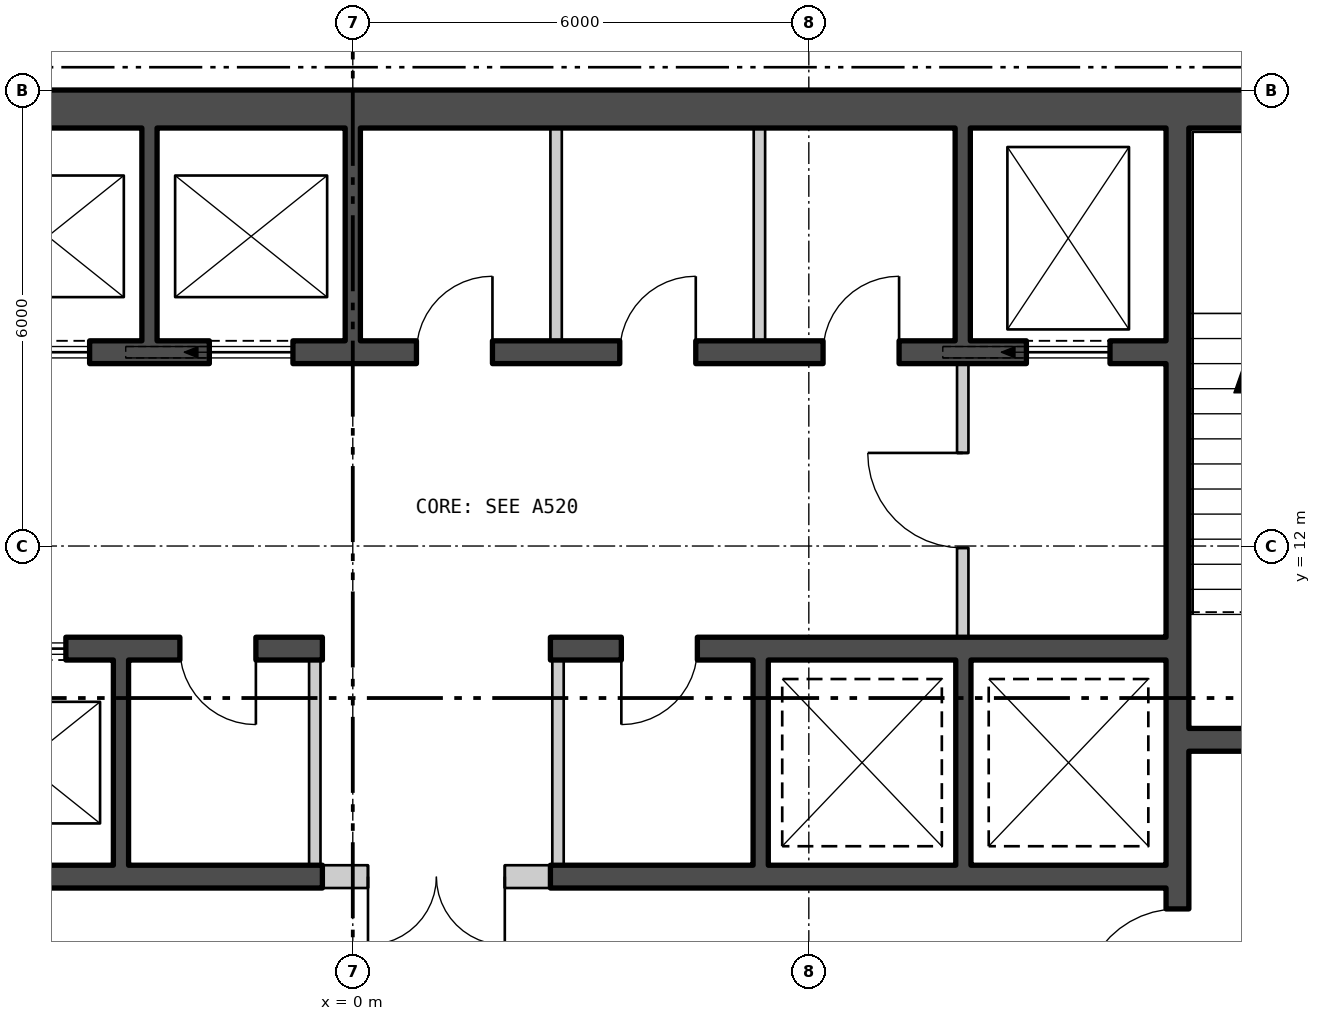
"""IFC4 building model, lengths in metres.
Left out: names, types, materials, properties, quantities, classifications, styles, units other than length and angle.
Written with IfcOpenShell. Run it as: python <this file> out.ifc"""

import sys

from ifc_helpers import new_model, si_unit, direction, frame, frame_2d, origin, place, context, subcontext, project, spatial, polyline, rectangle, outline, extrude, element, fill, save


model = new_model("IFC4")
c1 = context("Model", 3, precision=1e-05, world=origin(), true_north=direction((0.0, 1.0)))
c2 = subcontext(c1, "Body", "Model", "MODEL_VIEW")
j1 = project(units=[si_unit("LENGTHUNIT", "METRE"), si_unit("PLANEANGLEUNIT", "RADIAN")], contexts=[c1])
p1 = place(None, origin())
s1 = spatial("IfcSite", under=j1, at=p1, CompositionType="ELEMENT")
p2 = place(p1, origin())
s2 = spatial("IfcBuilding", under=s1, at=p2, CompositionType="ELEMENT")
p3 = place(p2, frame((0.0, 0.0, 139.8)))
s3 = spatial("IfcBuildingStorey", under=s2, at=p3, CompositionType="ELEMENT", Elevation=139.8)
p4 = place(p3, frame((4.36, -27.198, -0.18), z_axis=(0.0, 0.0, 1.0), x_axis=(0.500000335318, 0.866025210188, 0.0)))
e1 = element("IfcWall", 1, at=p4, inside=s3, PredefinedType="SOLIDWALL", context=c2, shape_type="SweptSolid", body=[
    extrude(outline(polyline([(-0.13, -0.225), (45.88, -0.225), (45.62, 0.225), (0.13, 0.225), (-0.13, -0.225)])), origin(), (0.0, 0.0, 1.0), 3.68),
])
p5 = place(p4, frame((1.425, 0.0, 1.08)))
e2 = element("IfcOpeningElement", 2, at=p5, cuts=e1, PredefinedType="OPENING", context=c2, shape_type="SweptSolid", body=[
    extrude(rectangle(XDim=2.4, YDim=2.0, at=frame_2d((1.2, 1.0))), frame((0.0, 0.235, 0.0), z_axis=(0.0, -1.0, 0.0), x_axis=(1.0, 0.0, 0.0)), (0.0, 0.0, 1.0), 0.47),
])
p6 = place(p4, frame((5.895, 0.0, 1.08)))
e3 = element("IfcOpeningElement", 3, at=p6, cuts=e1, PredefinedType="OPENING", context=c2, shape_type="SweptSolid", body=[
    extrude(rectangle(XDim=2.4, YDim=2.0, at=frame_2d((1.2, 1.0))), frame((0.0, 0.235, 0.0), z_axis=(0.0, -1.0, 0.0), x_axis=(1.0, 0.0, 0.0)), (0.0, 0.0, 1.0), 0.47),
])
p7 = place(p4, frame((10.403, 0.0, 1.08)))
e4 = element("IfcOpeningElement", 4, at=p7, cuts=e1, PredefinedType="OPENING", context=c2, shape_type="SweptSolid", body=[
    extrude(rectangle(XDim=2.4, YDim=2.0, at=frame_2d((1.2, 1.0))), frame((0.0, 0.235, 0.0), z_axis=(0.0, -1.0, 0.0), x_axis=(1.0, 0.0, 0.0)), (0.0, 0.0, 1.0), 0.47),
])
p8 = place(p4, frame((14.912, 0.0, 1.08)))
e5 = element("IfcOpeningElement", 5, at=p8, cuts=e1, PredefinedType="OPENING", context=c2, shape_type="SweptSolid", body=[
    extrude(rectangle(XDim=2.4, YDim=2.0, at=frame_2d((1.2, 1.0))), frame((0.0, 0.235, 0.0), z_axis=(0.0, -1.0, 0.0), x_axis=(1.0, 0.0, 0.0)), (0.0, 0.0, 1.0), 0.47),
])
p9 = place(p4, frame((19.421, 0.0, 1.08)))
e6 = element("IfcOpeningElement", 6, at=p9, cuts=e1, PredefinedType="OPENING", context=c2, shape_type="SweptSolid", body=[
    extrude(rectangle(XDim=2.4, YDim=2.0, at=frame_2d((1.2, 1.0))), frame((0.0, 0.235, 0.0), z_axis=(0.0, -1.0, 0.0), x_axis=(1.0, 0.0, 0.0)), (0.0, 0.0, 1.0), 0.47),
])
p10 = place(p4, frame((23.929, 0.0, 1.08)))
e7 = element("IfcOpeningElement", 7, at=p10, cuts=e1, PredefinedType="OPENING", context=c2, shape_type="SweptSolid", body=[
    extrude(rectangle(XDim=2.4, YDim=2.0, at=frame_2d((1.2, 1.0))), frame((0.0, 0.235, 0.0), z_axis=(0.0, -1.0, 0.0), x_axis=(1.0, 0.0, 0.0)), (0.0, 0.0, 1.0), 0.47),
])
p11 = place(p4, frame((37.455, 0.0, 1.08)))
e8 = element("IfcOpeningElement", 8, at=p11, cuts=e1, PredefinedType="OPENING", context=c2, shape_type="SweptSolid", body=[
    extrude(rectangle(XDim=2.4, YDim=2.0, at=frame_2d((1.2, 1.0))), frame((0.0, 0.235, 0.0), z_axis=(0.0, -1.0, 0.0), x_axis=(1.0, 0.0, 0.0)), (0.0, 0.0, 1.0), 0.47),
])
p12 = place(p4, frame((41.925, 0.0, 1.08)))
e9 = element("IfcOpeningElement", 9, at=p12, cuts=e1, PredefinedType="OPENING", context=c2, shape_type="SweptSolid", body=[
    extrude(rectangle(XDim=2.4, YDim=2.0, at=frame_2d((1.2, 1.0))), frame((0.0, 0.235, 0.0), z_axis=(0.0, -1.0, 0.0), x_axis=(1.0, 0.0, 0.0)), (0.0, 0.0, 1.0), 0.47),
])
p13 = place(p3, frame((-16.2, 17.75, 0.0), z_axis=(0.0, 0.0, 1.0), x_axis=(1.0, 0.0, 0.0)))
e10 = element("IfcWall", 10, at=p13, inside=s3, PredefinedType="SHEAR", context=c2, shape_type="SweptSolid", body=[
    extrude(rectangle(XDim=32.4, YDim=0.5, at=frame_2d((16.2, 0.0))), origin(), (0.0, 0.0, 1.0), 3.7),
])
p14 = place(p3, frame((10.85, 2.5, 0.0), z_axis=(0.0, 0.0, 1.0), x_axis=(0.0, 1.0, 0.0)))
e11 = element("IfcWall", 11, at=p14, inside=s3, PredefinedType="SHEAR", context=c2, shape_type="SweptSolid", body=[
    extrude(rectangle(XDim=15.0, YDim=0.3, at=frame_2d((7.5, 0.0))), origin(), (0.0, 0.0, 1.0), 3.7),
])
p15 = place(p14, frame((3.475, 0.0, 0.0)))
e12 = element("IfcOpeningElement", 12, at=p15, cuts=e11, PredefinedType="OPENING", context=c2, shape_type="SweptSolid", body=[
    extrude(rectangle(XDim=1.25, YDim=2.1, at=frame_2d((0.625, 1.05))), frame((0.0, 0.16, 0.0), z_axis=(0.0, -1.0, 0.0), x_axis=(1.0, 0.0, 0.0)), (0.0, 0.0, 1.0), 0.32),
])
p16 = place(p14, frame((1.125, 0.0, 0.0)))
e13 = element("IfcOpeningElement", 13, at=p16, cuts=e11, PredefinedType="OPENING", context=c2, shape_type="SweptSolid", body=[
    extrude(rectangle(XDim=1.0, YDim=2.1, at=frame_2d((0.5, 1.05))), frame((0.0, 0.16, 0.0), z_axis=(0.0, -1.0, 0.0), x_axis=(1.0, 0.0, 0.0)), (0.0, 0.0, 1.0), 0.32),
])
p17 = place(p3, frame((11.0, 9.45, 0.0), z_axis=(0.0, 0.0, 1.0), x_axis=(1.0, 0.0, 0.0)))
e14 = element("IfcWall", 14, at=p17, inside=s3, PredefinedType="SHEAR", context=c2, shape_type="SweptSolid", body=[
    extrude(rectangle(XDim=3.2, YDim=0.3, at=frame_2d((1.6, 0.0))), origin(), (0.0, 0.0, 1.0), 3.7),
])
p18 = place(p17, frame((1.0, 0.0, 0.0)))
e15 = element("IfcOpeningElement", 15, at=p18, cuts=e14, PredefinedType="OPENING", context=c2, shape_type="SweptSolid", body=[
    extrude(rectangle(XDim=1.2, YDim=2.1, at=frame_2d((0.6, 1.05))), frame((0.0, 0.16, 0.0), z_axis=(0.0, -1.0, 0.0), x_axis=(1.0, 0.0, 0.0)), (0.0, 0.0, 1.0), 0.32),
])
p19 = place(p3, frame((-10.7, 14.55, 0.0), z_axis=(0.0, 0.0, 1.0), x_axis=(1.0, 0.0, 0.0)))
e16 = element("IfcWall", 16, at=p19, inside=s3, PredefinedType="SHEAR", context=c2, shape_type="SweptSolid", body=[
    extrude(rectangle(XDim=21.4, YDim=0.3, at=frame_2d((10.7, 0.0))), origin(), (0.0, 0.0, 1.0), 3.7),
])
p20 = place(p19, frame((0.738, 0.0, 0.0)))
e17 = element("IfcOpeningElement", 17, at=p20, cuts=e16, PredefinedType="OPENING", context=c2, shape_type="SweptSolid", body=[
    extrude(rectangle(XDim=1.1, YDim=2.1, at=frame_2d((0.55, 1.05))), frame((0.0, 0.16, 0.0), z_axis=(0.0, -1.0, 0.0), x_axis=(1.0, 0.0, 0.0)), (0.0, 0.0, 1.0), 0.32),
])
p21 = place(p19, frame((3.462, 0.0, 0.0)))
e18 = element("IfcOpeningElement", 18, at=p21, cuts=e16, PredefinedType="OPENING", context=c2, shape_type="SweptSolid", body=[
    extrude(rectangle(XDim=1.1, YDim=2.1, at=frame_2d((0.55, 1.05))), frame((0.0, 0.16, 0.0), z_axis=(0.0, -1.0, 0.0), x_axis=(1.0, 0.0, 0.0)), (0.0, 0.0, 1.0), 0.32),
])
p22 = place(p19, frame((6.138, 0.0, 0.0)))
e19 = element("IfcOpeningElement", 19, at=p22, cuts=e16, PredefinedType="OPENING", context=c2, shape_type="SweptSolid", body=[
    extrude(rectangle(XDim=1.1, YDim=2.1, at=frame_2d((0.55, 1.05))), frame((0.0, 0.16, 0.0), z_axis=(0.0, -1.0, 0.0), x_axis=(1.0, 0.0, 0.0)), (0.0, 0.0, 1.0), 0.32),
])
p23 = place(p19, frame((8.812, 0.0, 0.0)))
e20 = element("IfcOpeningElement", 20, at=p23, cuts=e16, PredefinedType="OPENING", context=c2, shape_type="SweptSolid", body=[
    extrude(rectangle(XDim=1.1, YDim=2.1, at=frame_2d((0.55, 1.05))), frame((0.0, 0.16, 0.0), z_axis=(0.0, -1.0, 0.0), x_axis=(1.0, 0.0, 0.0)), (0.0, 0.0, 1.0), 0.32),
])
p24 = place(p19, frame((19.562, 0.0, 0.0)))
e21 = element("IfcOpeningElement", 21, at=p24, cuts=e16, PredefinedType="OPENING", context=c2, shape_type="SweptSolid", body=[
    extrude(rectangle(XDim=1.1, YDim=2.1, at=frame_2d((0.55, 1.05))), frame((0.0, 0.16, 0.0), z_axis=(0.0, -1.0, 0.0), x_axis=(1.0, 0.0, 0.0)), (0.0, 0.0, 1.0), 0.32),
])
p25 = place(p19, frame((11.537, 0.0, 0.0)))
e22 = element("IfcOpeningElement", 22, at=p25, cuts=e16, PredefinedType="OPENING", context=c2, shape_type="SweptSolid", body=[
    extrude(rectangle(XDim=1.0, YDim=2.1, at=frame_2d((0.5, 1.05))), frame((0.0, 0.16, 0.0), z_axis=(0.0, -1.0, 0.0), x_axis=(1.0, 0.0, 0.0)), (0.0, 0.0, 1.0), 0.32),
])
p26 = place(p19, frame((14.213, 0.0, 0.0)))
e23 = element("IfcOpeningElement", 23, at=p26, cuts=e16, PredefinedType="OPENING", context=c2, shape_type="SweptSolid", body=[
    extrude(rectangle(XDim=1.0, YDim=2.1, at=frame_2d((0.5, 1.05))), frame((0.0, 0.16, 0.0), z_axis=(0.0, -1.0, 0.0), x_axis=(1.0, 0.0, 0.0)), (0.0, 0.0, 1.0), 0.32),
])
p27 = place(p19, frame((16.887, 0.0, 0.0)))
e24 = element("IfcOpeningElement", 24, at=p27, cuts=e16, PredefinedType="OPENING", context=c2, shape_type="SweptSolid", body=[
    extrude(rectangle(XDim=1.0, YDim=2.1, at=frame_2d((0.5, 1.05))), frame((0.0, 0.16, 0.0), z_axis=(0.0, -1.0, 0.0), x_axis=(1.0, 0.0, 0.0)), (0.0, 0.0, 1.0), 0.32),
])
p28 = place(p3, frame((-10.7, 10.65, 0.0), z_axis=(0.0, 0.0, 1.0), x_axis=(1.0, 0.0, 0.0)))
e25 = element("IfcWall", 25, at=p28, inside=s3, PredefinedType="SHEAR", context=c2, shape_type="SweptSolid", body=[
    extrude(rectangle(XDim=10.3, YDim=0.3, at=frame_2d((5.15, 0.0))), origin(), (0.0, 0.0, 1.0), 3.7),
])
p29 = place(p28, frame((0.675, 0.0, 0.0)))
e26 = element("IfcOpeningElement", 26, at=p29, cuts=e25, PredefinedType="OPENING", context=c2, shape_type="SweptSolid", body=[
    extrude(rectangle(XDim=1.1, YDim=2.1, at=frame_2d((0.55, 1.05))), frame((0.0, 0.16, 0.0), z_axis=(0.0, -1.0, 0.0), x_axis=(1.0, 0.0, 0.0)), (0.0, 0.0, 1.0), 0.32),
])
p30 = place(p28, frame((3.275, 0.0, 0.0)))
e27 = element("IfcOpeningElement", 27, at=p30, cuts=e25, PredefinedType="OPENING", context=c2, shape_type="SweptSolid", body=[
    extrude(rectangle(XDim=1.1, YDim=2.1, at=frame_2d((0.55, 1.05))), frame((0.0, 0.16, 0.0), z_axis=(0.0, -1.0, 0.0), x_axis=(1.0, 0.0, 0.0)), (0.0, 0.0, 1.0), 0.32),
])
p31 = place(p28, frame((5.825, 0.0, 0.0)))
e28 = element("IfcOpeningElement", 28, at=p31, cuts=e25, PredefinedType="OPENING", context=c2, shape_type="SweptSolid", body=[
    extrude(rectangle(XDim=1.1, YDim=2.1, at=frame_2d((0.55, 1.05))), frame((0.0, 0.16, 0.0), z_axis=(0.0, -1.0, 0.0), x_axis=(1.0, 0.0, 0.0)), (0.0, 0.0, 1.0), 0.32),
])
p32 = place(p28, frame((8.425, 0.0, 0.0)))
e29 = element("IfcOpeningElement", 29, at=p32, cuts=e25, PredefinedType="OPENING", context=c2, shape_type="SweptSolid", body=[
    extrude(rectangle(XDim=1.0, YDim=2.1, at=frame_2d((0.5, 1.05))), frame((0.0, 0.16, 0.0), z_axis=(0.0, -1.0, 0.0), x_axis=(1.0, 0.0, 0.0)), (0.0, 0.0, 1.0), 0.32),
])
p33 = place(p3, frame((-10.7, 7.65, 0.0), z_axis=(0.0, 0.0, 1.0), x_axis=(1.0, 0.0, 0.0)))
e30 = element("IfcWall", 30, at=p33, inside=s3, PredefinedType="SHEAR", context=c2, shape_type="SweptSolid", body=[
    extrude(rectangle(XDim=10.3, YDim=0.3, at=frame_2d((5.15, 0.0))), origin(), (0.0, 0.0, 1.0), 3.7),
])
p34 = place(p3, frame((2.6, 10.65, 0.0), z_axis=(0.0, 0.0, 1.0), x_axis=(1.0, 0.0, 0.0)))
e31 = element("IfcWall", 31, at=p34, inside=s3, PredefinedType="SHEAR", context=c2, shape_type="SweptSolid", body=[
    extrude(rectangle(XDim=8.1, YDim=0.3, at=frame_2d((4.05, 0.0))), origin(), (0.0, 0.0, 1.0), 3.7),
])
p35 = place(p34, frame((0.933, 0.0, 0.0)))
e32 = element("IfcOpeningElement", 32, at=p35, cuts=e31, PredefinedType="OPENING", context=c2, shape_type="SweptSolid", body=[
    extrude(rectangle(XDim=1.0, YDim=2.1, at=frame_2d((0.5, 1.05))), frame((0.0, 0.16, 0.0), z_axis=(0.0, -1.0, 0.0), x_axis=(1.0, 0.0, 0.0)), (0.0, 0.0, 1.0), 0.32),
])
p36 = place(p3, frame((2.6, 7.65, 0.0), z_axis=(0.0, 0.0, 1.0), x_axis=(1.0, 0.0, 0.0)))
e33 = element("IfcWall", 33, at=p36, inside=s3, PredefinedType="SHEAR", context=c2, shape_type="SweptSolid", body=[
    extrude(rectangle(XDim=8.1, YDim=0.3, at=frame_2d((4.05, 0.0))), origin(), (0.0, 0.0, 1.0), 3.7),
])
for number, where, z_axis, x_axis in (
    (34, (-2.675, 14.7, 0.0), (0.0, 0.0, 1.0), (0.0, 1.0, 0.0)),
    (35, (0.0, 14.7, 0.0), (0.0, 0.0, 1.0), (0.0, 1.0, 0.0)),
):
    element("IfcWall", number, at=place(p3, frame(where, z_axis=z_axis, x_axis=x_axis)), inside=s3, PredefinedType="SHEAR", context=c2, shape_type="SweptSolid", body=[
        extrude(rectangle(XDim=2.8, YDim=0.2, at=frame_2d((1.4, 0.0))), origin(), (0.0, 0.0, 1.0), 3.7),
    ])
for number, where, z_axis, x_axis in (
    (36, (2.675, 14.7, 0.0), (0.0, 0.0, 1.0), (0.0, 1.0, 0.0)),
    (37, (5.35, 14.7, 0.0), (0.0, 0.0, 1.0), (0.0, 1.0, 0.0)),
):
    element("IfcWall", number, at=place(p3, frame(where, z_axis=z_axis, x_axis=x_axis)), inside=s3, PredefinedType="PARTITIONING", context=c2, shape_type="SweptSolid", body=[
        extrude(rectangle(XDim=2.8, YDim=0.15, at=frame_2d((1.4, 0.0))), origin(), (0.0, 0.0, 1.0), 3.7),
    ])
p37 = place(p3, frame((8.025, 14.7, 0.0), z_axis=(0.0, 0.0, 1.0), x_axis=(0.0, 1.0, 0.0)))
e38 = element("IfcWall", 38, at=p37, inside=s3, PredefinedType="SHEAR", context=c2, shape_type="SweptSolid", body=[
    extrude(rectangle(XDim=2.8, YDim=0.2, at=frame_2d((1.4, 0.0))), origin(), (0.0, 0.0, 1.0), 3.7),
])
p38 = place(p3, frame((-3.05, 7.8, 0.0), z_axis=(0.0, 0.0, 1.0), x_axis=(0.0, 1.0, 0.0)))
e39 = element("IfcWall", 39, at=p38, inside=s3, PredefinedType="SHEAR", context=c2, shape_type="SweptSolid", body=[
    extrude(rectangle(XDim=2.7, YDim=0.2, at=frame_2d((1.35, 0.0))), origin(), (0.0, 0.0, 1.0), 3.7),
])
for number, where, z_axis, x_axis in (
    (40, (-0.5, 7.8, 0.0), (0.0, 0.0, 1.0), (0.0, 1.0, 0.0)),
    (41, (2.7, 7.8, 0.0), (0.0, 0.0, 1.0), (0.0, 1.0, 0.0)),
):
    element("IfcWall", number, at=place(p3, frame(where, z_axis=z_axis, x_axis=x_axis)), inside=s3, PredefinedType="PARTITIONING", context=c2, shape_type="SweptSolid", body=[
        extrude(rectangle(XDim=2.7, YDim=0.15, at=frame_2d((1.35, 0.0))), origin(), (0.0, 0.0, 1.0), 3.7),
    ])
for number, where, z_axis, x_axis in (
    (42, (5.367, 7.8, 0.0), (0.0, 0.0, 1.0), (0.0, 1.0, 0.0)),
    (43, (8.033, 7.8, 0.0), (0.0, 0.0, 1.0), (0.0, 1.0, 0.0)),
):
    element("IfcWall", number, at=place(p3, frame(where, z_axis=z_axis, x_axis=x_axis)), inside=s3, PredefinedType="SHEAR", context=c2, shape_type="SweptSolid", body=[
        extrude(rectangle(XDim=2.7, YDim=0.2, at=frame_2d((1.35, 0.0))), origin(), (0.0, 0.0, 1.0), 3.7),
    ])
p39 = place(p3, frame((8.025, 10.8, 0.0), z_axis=(0.0, 0.0, 1.0), x_axis=(0.0, 1.0, 0.0)))
e44 = element("IfcWall", 44, at=p39, inside=s3, PredefinedType="PARTITIONING", context=c2, shape_type="SweptSolid", body=[
    extrude(rectangle(XDim=3.6, YDim=0.15, at=frame_2d((1.8, 0.0))), origin(), (0.0, 0.0, 1.0), 3.7),
])
p40 = place(p39, frame((1.175, 0.0, 0.0)))
e45 = element("IfcOpeningElement", 45, at=p40, cuts=e44, PredefinedType="OPENING", context=c2, shape_type="SweptSolid", body=[
    extrude(rectangle(XDim=1.25, YDim=2.1, at=frame_2d((0.625, 1.05))), frame((0.0, 0.085, 0.0), z_axis=(0.0, -1.0, 0.0), x_axis=(1.0, 0.0, 0.0)), (0.0, 0.0, 1.0), 0.17),
])
p41 = place(p3, frame((-0.4, 7.65, 0.0), z_axis=(0.0, 0.0, 1.0), x_axis=(1.0, 0.0, 0.0)))
e46 = element("IfcWall", 46, at=p41, inside=s3, PredefinedType="PARTITIONING", context=c2, shape_type="SweptSolid", body=[
    extrude(rectangle(XDim=3.0, YDim=0.3, at=frame_2d((1.5, 0.0))), origin(), (0.0, 0.0, 1.0), 3.7),
])
p42 = place(p41, frame((0.6, 0.0, 0.0)))
e47 = element("IfcOpeningElement", 47, at=p42, cuts=e46, PredefinedType="OPENING", context=c2, shape_type="SweptSolid", body=[
    extrude(rectangle(XDim=1.8, YDim=2.4, at=frame_2d((0.9, 1.2))), frame((0.0, 0.16, 0.0), z_axis=(0.0, -1.0, 0.0), x_axis=(1.0, 0.0, 0.0)), (0.0, 0.0, 1.0), 0.32),
])
p43 = place(p22, origin())
e48 = element("IfcDoor", 48, at=p43, inside=s3, OperationType="SLIDING_TO_LEFT", PredefinedType="DOOR", context=c2, shape_type="SweptSolid", body=[
    extrude(rectangle(XDim=1.1, YDim=2.1, at=frame_2d((0.55, 1.05))), frame((0.0, 0.025, 0.0), z_axis=(0.0, -1.0, 0.0), x_axis=(1.0, 0.0, 0.0)), (0.0, 0.0, 1.0), 0.05),
])
fill(e19, e48)
p44 = place(p23, origin())
e49 = element("IfcDoor", 49, at=p44, inside=s3, OperationType="SLIDING_TO_LEFT", PredefinedType="DOOR", context=c2, shape_type="SweptSolid", body=[
    extrude(rectangle(XDim=1.1, YDim=2.1, at=frame_2d((0.55, 1.05))), frame((0.0, 0.025, 0.0), z_axis=(0.0, -1.0, 0.0), x_axis=(1.0, 0.0, 0.0)), (0.0, 0.0, 1.0), 0.05),
])
fill(e20, e49)
p45 = place(p24, origin())
e50 = element("IfcDoor", 50, at=p45, inside=s3, OperationType="SLIDING_TO_LEFT", PredefinedType="DOOR", context=c2, shape_type="SweptSolid", body=[
    extrude(rectangle(XDim=1.1, YDim=2.1, at=frame_2d((0.55, 1.05))), frame((0.0, 0.025, 0.0), z_axis=(0.0, -1.0, 0.0), x_axis=(1.0, 0.0, 0.0)), (0.0, 0.0, 1.0), 0.05),
])
fill(e21, e50)
p46 = place(p31, origin())
e51 = element("IfcDoor", 51, at=p46, inside=s3, OperationType="SLIDING_TO_LEFT", PredefinedType="DOOR", context=c2, shape_type="SweptSolid", body=[
    extrude(rectangle(XDim=1.1, YDim=2.1, at=frame_2d((0.55, 1.05))), frame((0.0, 0.025, 0.0), z_axis=(0.0, -1.0, 0.0), x_axis=(1.0, 0.0, 0.0)), (0.0, 0.0, 1.0), 0.05),
])
fill(e28, e51)
p47 = place(p25, origin())
e52 = element("IfcDoor", 52, at=p47, inside=s3, OperationType="SINGLE_SWING_LEFT", PredefinedType="DOOR", context=c2, shape_type="SweptSolid", body=[
    extrude(rectangle(XDim=1.0, YDim=2.1, at=frame_2d((0.5, 1.05))), frame((0.0, 0.025, 0.0), z_axis=(0.0, -1.0, 0.0), x_axis=(1.0, 0.0, 0.0)), (0.0, 0.0, 1.0), 0.05),
])
fill(e22, e52)
p48 = place(p26, origin())
e53 = element("IfcDoor", 53, at=p48, inside=s3, OperationType="SINGLE_SWING_LEFT", PredefinedType="DOOR", context=c2, shape_type="SweptSolid", body=[
    extrude(rectangle(XDim=1.0, YDim=2.1, at=frame_2d((0.5, 1.05))), frame((0.0, 0.025, 0.0), z_axis=(0.0, -1.0, 0.0), x_axis=(1.0, 0.0, 0.0)), (0.0, 0.0, 1.0), 0.05),
])
fill(e23, e53)
p49 = place(p27, origin())
e54 = element("IfcDoor", 54, at=p49, inside=s3, OperationType="SINGLE_SWING_LEFT", PredefinedType="DOOR", context=c2, shape_type="SweptSolid", body=[
    extrude(rectangle(XDim=1.0, YDim=2.1, at=frame_2d((0.5, 1.05))), frame((0.0, 0.025, 0.0), z_axis=(0.0, -1.0, 0.0), x_axis=(1.0, 0.0, 0.0)), (0.0, 0.0, 1.0), 0.05),
])
fill(e24, e54)
p50 = place(p32, origin())
e55 = element("IfcDoor", 55, at=p50, inside=s3, OperationType="SINGLE_SWING_RIGHT", PredefinedType="DOOR", context=c2, shape_type="SweptSolid", body=[
    extrude(rectangle(XDim=1.0, YDim=2.1, at=frame_2d((0.5, 1.05))), frame((0.0, 0.025, 0.0), z_axis=(0.0, -1.0, 0.0), x_axis=(1.0, 0.0, 0.0)), (0.0, 0.0, 1.0), 0.05),
])
fill(e29, e55)
p51 = place(p35, origin())
e56 = element("IfcDoor", 56, at=p51, inside=s3, OperationType="SINGLE_SWING_LEFT", PredefinedType="DOOR", context=c2, shape_type="SweptSolid", body=[
    extrude(rectangle(XDim=1.0, YDim=2.1, at=frame_2d((0.5, 1.05))), frame((0.0, 0.025, 0.0), z_axis=(0.0, -1.0, 0.0), x_axis=(1.0, 0.0, 0.0)), (0.0, 0.0, 1.0), 0.05),
])
fill(e32, e56)
p52 = place(p40, origin())
e57 = element("IfcDoor", 57, at=p52, inside=s3, OperationType="SINGLE_SWING_LEFT", PredefinedType="DOOR", context=c2, shape_type="SweptSolid", body=[
    extrude(rectangle(XDim=1.25, YDim=2.1, at=frame_2d((0.625, 1.05))), frame((0.0, 0.025, 0.0), z_axis=(0.0, -1.0, 0.0), x_axis=(1.0, 0.0, 0.0)), (0.0, 0.0, 1.0), 0.05),
])
fill(e45, e57)
p53 = place(p15, origin())
e58 = element("IfcDoor", 58, at=p53, inside=s3, OperationType="SINGLE_SWING_RIGHT", PredefinedType="DOOR", context=c2, shape_type="SweptSolid", body=[
    extrude(rectangle(XDim=1.25, YDim=2.1, at=frame_2d((0.625, 1.05))), frame((0.0, 0.025, 0.0), z_axis=(0.0, -1.0, 0.0), x_axis=(1.0, 0.0, 0.0)), (0.0, 0.0, 1.0), 0.05),
])
fill(e12, e58)
p54 = place(p42, origin())
e59 = element("IfcDoor", 59, at=p54, inside=s3, OperationType="DOUBLE_DOOR_SINGLE_SWING", PredefinedType="DOOR", context=c2, shape_type="SweptSolid", body=[
    extrude(rectangle(XDim=1.8, YDim=2.4, at=frame_2d((0.9, 1.2))), frame((0.0, 0.025, 0.0), z_axis=(0.0, -1.0, 0.0), x_axis=(1.0, 0.0, 0.0)), (0.0, 0.0, 1.0), 0.05),
])
fill(e47, e59)
save(model, sys.argv[1])
